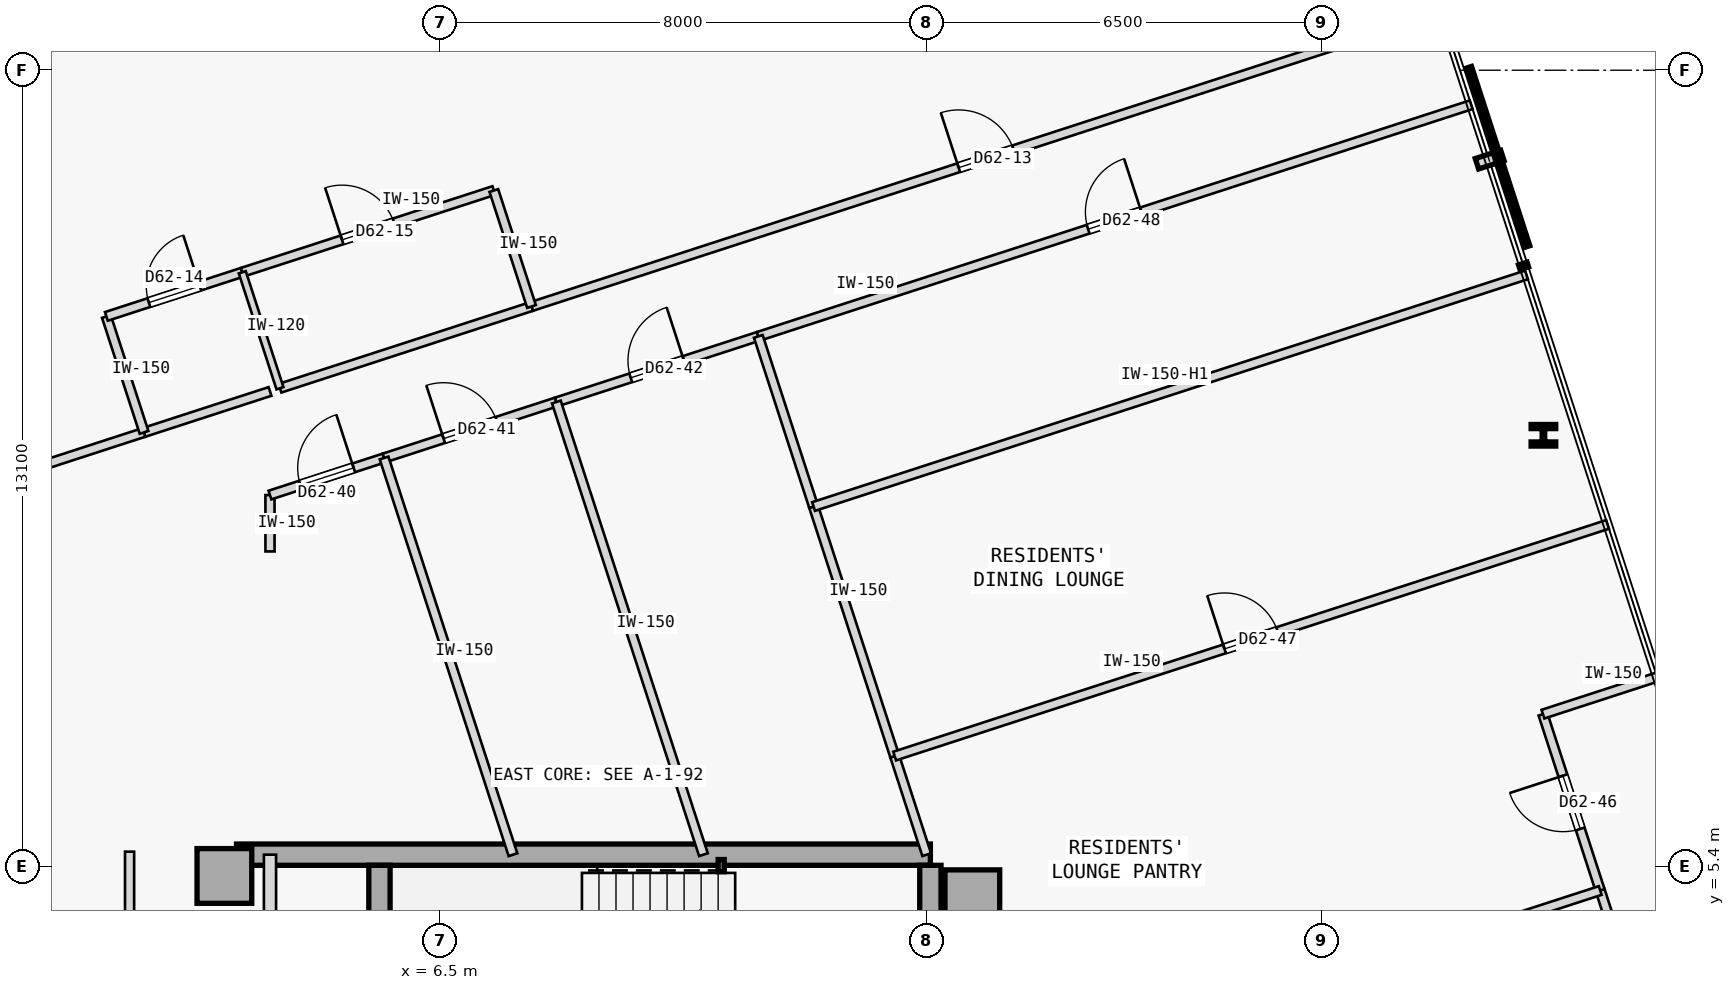
"""IFC4 building model, lengths in metres.
Left out: names, types, materials, properties, quantities, classifications, styles, units other than length and angle.
Written with IfcOpenShell. Run it as: python <this file> out.ifc"""

import sys

from ifc_helpers import new_model, si_unit, direction, frame, frame_2d, origin, origin_2d, place, context, subcontext, project, spatial, rectangle, hollow_rectangle, i_section, extrude, element, fill, save


model = new_model("IFC4")
c1 = context("Model", 3, precision=1e-05, world=origin(), true_north=direction((0.0, 1.0)))
c2 = subcontext(c1, "Body", "Model", "MODEL_VIEW")
j1 = project(units=[si_unit("LENGTHUNIT", "METRE"), si_unit("PLANEANGLEUNIT", "RADIAN")], contexts=[c1])
p1 = place(None, origin())
s1 = spatial("IfcSite", under=j1, at=p1, CompositionType="ELEMENT")
p2 = place(p1, origin())
s2 = spatial("IfcBuilding", under=s1, at=p2, CompositionType="ELEMENT")
p3 = place(p2, frame((0.0, 0.0, 234.35)))
s3 = spatial("IfcBuildingStorey", under=s2, at=p3, CompositionType="ELEMENT", Elevation=234.35)
for number, where, z_axis, x_axis in (
    (1, (15.25, 4.9, 0.0), (0.0, 0.0, 1.0), (1.0, 0.0, 0.0)),
    (2, (2.95, 5.25, 0.0), (0.0, 0.0, 1.0), (1.0, 0.0, 0.0)),
):
    element("IfcColumn", number, at=place(p3, frame(where, z_axis=z_axis, x_axis=x_axis)), inside=s3, PredefinedType="COLUMN", context=c2, shape_type="SweptSolid", body=[
        extrude(rectangle(XDim=0.9, YDim=0.9, at=origin_2d()), origin(), (0.0, 0.0, 1.0), 3.35),
    ])
p4 = place(p3, frame((3.15, 5.6, 0.0), z_axis=(0.0, 0.0, 1.0), x_axis=(1.0, 0.0, 0.0)))
e3 = element("IfcWall", 3, at=p4, inside=s3, PredefinedType="SHEAR", context=c2, shape_type="SweptSolid", body=[
    extrude(rectangle(XDim=11.41, YDim=0.35, at=frame_2d((5.705, 0.0))), origin(), (0.0, 0.0, 1.0), 3.125),
])
p5 = place(p3, frame((14.56, -5.425, 0.0), z_axis=(0.0, 0.0, 1.0), x_axis=(0.0, 1.0, 0.0)))
e4 = element("IfcWall", 4, at=p5, inside=s3, PredefinedType="SHEAR", context=c2, shape_type="SweptSolid", body=[
    extrude(rectangle(XDim=10.85, YDim=0.35, at=frame_2d((5.425, 0.0))), origin(), (0.0, 0.0, 1.0), 3.125),
])
p6 = place(p3, frame((5.5, 2.15, 0.0), z_axis=(0.0, 0.0, 1.0), x_axis=(0.0, 1.0, 0.0)))
e5 = element("IfcWall", 5, at=p6, inside=s3, PredefinedType="SHEAR", context=c2, shape_type="SweptSolid", body=[
    extrude(rectangle(XDim=3.275, YDim=0.35, at=frame_2d((1.638, 0.0))), origin(), (0.0, 0.0, 1.0), 3.125),
])
p7 = place(p3, frame((11.12, 5.42, 0.0), z_axis=(0.0, 0.0, 1.0), x_axis=(1.0, 0.0, 0.0)))
e6 = element("IfcColumn", 6, at=p7, inside=s3, PredefinedType="COLUMN", context=c2, shape_type="SweptSolid", body=[
    extrude(hollow_rectangle(XDim=0.1, YDim=0.2, WallThickness=0.008, at=origin_2d()), origin(), (0.0, 0.0, 1.0), 3.35),
])
p8 = place(p3, frame((24.642, 12.497, 0.0), z_axis=(0.0, 0.0, 1.0), x_axis=(1.0, 0.0, 0.0)))
e7 = element("IfcColumn", 7, at=p8, inside=s3, PredefinedType="COLUMN", context=c2, shape_type="SweptSolid", body=[
    extrude(i_section(OverallWidth=0.405, OverallDepth=0.355, WebThickness=0.042, FlangeThickness=0.068, FilletRadius=0.015, at=origin_2d()), origin(), (0.0, 0.0, 1.0), 3.35),
])
p9 = place(p3, frame((3.7, -1.15, 0.0), z_axis=(0.0, 0.0, 1.0), x_axis=(0.0, 1.0, 0.0)))
e8 = element("IfcWall", 8, at=p9, inside=s3, PredefinedType="STANDARD", context=c2, shape_type="SweptSolid", body=[
    extrude(rectangle(XDim=6.75, YDim=0.2, at=frame_2d((3.375, 0.0))), origin(), (0.0, 0.0, 1.0), 3.125),
])
p10 = place(p9, frame((0.35, 0.0, 0.0)))
e9 = element("IfcOpeningElement", 9, at=p10, cuts=e8, PredefinedType="OPENING", context=c2, shape_type="SweptSolid", body=[
    extrude(rectangle(XDim=0.88, YDim=2.15, at=frame_2d((0.44, 1.075))), frame((0.0, 0.11, 0.0), z_axis=(0.0, -1.0, 0.0), x_axis=(1.0, 0.0, 0.0)), (0.0, 0.0, 1.0), 0.22),
])
p11 = place(p9, frame((2.55, 0.0, 0.0)))
e10 = element("IfcOpeningElement", 10, at=p11, cuts=e8, PredefinedType="OPENING", context=c2, shape_type="SweptSolid", body=[
    extrude(rectangle(XDim=0.92, YDim=2.15, at=frame_2d((0.46, 1.075))), frame((0.0, 0.11, 0.0), z_axis=(0.0, -1.0, 0.0), x_axis=(1.0, 0.0, 0.0)), (0.0, 0.0, 1.0), 0.22),
])
p12 = place(p9, frame((4.22, 0.0, 0.0)))
e11 = element("IfcOpeningElement", 11, at=p12, cuts=e8, PredefinedType="OPENING", context=c2, shape_type="SweptSolid", body=[
    extrude(rectangle(XDim=0.88, YDim=2.15, at=frame_2d((0.44, 1.075))), frame((0.0, 0.11, 0.0), z_axis=(0.0, -1.0, 0.0), x_axis=(1.0, 0.0, 0.0)), (0.0, 0.0, 1.0), 0.22),
])
p13 = place(p3, frame((1.391, -5.648, 0.0), z_axis=(0.0, 0.0, 1.0), x_axis=(-4.3218947e-05, 0.999999999066, 0.0)))
e12 = element("IfcWall", 12, at=p13, inside=s3, PredefinedType="PARTITIONING", context=c2, shape_type="SweptSolid", body=[
    extrude(rectangle(XDim=11.298, YDim=0.15, at=frame_2d((5.649, 0.0))), origin(), (0.0, 0.0, 1.0), 3.125),
])
p14 = place(p3, frame((-4.354, 10.601, 0.0), z_axis=(0.0, 0.0, 1.0), x_axis=(0.951050896078, 0.30903429109, 0.0)))
e13 = element("IfcWall", 13, at=p14, inside=s3, PredefinedType="PARTITIONING", context=c2, shape_type="SweptSolid", body=[
    extrude(rectangle(XDim=6.29, YDim=0.15, at=frame_2d((3.145, 0.0))), origin(), (0.0, 0.0, 1.0), 3.125),
])
p15 = place(p3, frame((8.001, 14.615, 0.0), z_axis=(0.0, 0.0, 1.0), x_axis=(0.951056661035, 0.309016548911, 0.0)))
e14 = element("IfcWall", 14, at=p15, inside=s3, PredefinedType="PARTITIONING", context=c2, shape_type="SweptSolid", body=[
    extrude(rectangle(XDim=15.722, YDim=0.15, at=frame_2d((7.861, 0.0))), origin(), (0.0, 0.0, 1.0), 3.125),
])
p16 = place(p15, frame((7.386, 0.0, 0.0)))
e15 = element("IfcOpeningElement", 15, at=p16, cuts=e14, PredefinedType="OPENING", context=c2, shape_type="SweptSolid", body=[
    extrude(rectangle(XDim=0.95, YDim=2.15, at=frame_2d((0.475, 1.075))), frame((0.0, 0.085, 0.0), z_axis=(0.0, -1.0, 0.0), x_axis=(1.0, 0.0, 0.0)), (0.0, 0.0, 1.0), 0.17),
])
p17 = place(p3, frame((1.629, 12.544, 0.0), z_axis=(0.0, 0.0, 1.0), x_axis=(0.951087596826, 0.308921321963, 0.0)))
e16 = element("IfcWall", 16, at=p17, inside=s3, PredefinedType="PARTITIONING", context=c2, shape_type="SweptSolid", body=[
    extrude(rectangle(XDim=2.178, YDim=0.15, at=frame_2d((1.089, 0.0))), origin(), (0.0, 0.0, 1.0), 3.125),
])
p18 = place(p3, frame((3.864, 13.271, 0.0), z_axis=(0.0, 0.0, 1.0), x_axis=(0.951052627573, 0.309028962374, 0.0)))
e17 = element("IfcWall", 17, at=p18, inside=s3, PredefinedType="PARTITIONING", context=c2, shape_type="SweptSolid", body=[
    extrude(rectangle(XDim=4.35, YDim=0.15, at=frame_2d((2.175, 0.0))), origin(), (0.0, 0.0, 1.0), 3.125),
])
p19 = place(p3, frame((3.7, 10.587, 0.0), z_axis=(0.0, 0.0, 1.0), x_axis=(-0.000789889169, 0.999999688038, 0.0)))
e18 = element("IfcWall", 18, at=p19, inside=s3, PredefinedType="PARTITIONING", context=c2, shape_type="SweptSolid", body=[
    extrude(rectangle(XDim=0.927, YDim=0.15, at=frame_2d((0.464, 0.0))), origin(), (0.0, 0.0, 1.0), 3.125),
])
p20 = place(p3, frame((3.699, 11.514, 0.0), z_axis=(0.0, 0.0, 1.0), x_axis=(0.951068617763, 0.308979747405, 0.0)))
e19 = element("IfcWall", 19, at=p20, inside=s3, PredefinedType="PARTITIONING", context=c2, shape_type="SweptSolid", body=[
    extrude(rectangle(XDim=1.973, YDim=0.15, at=frame_2d((0.986, 0.0))), origin(), (0.0, 0.0, 1.0), 3.125),
])
p21 = place(p20, frame((0.527, 0.0, 0.0)))
e20 = element("IfcOpeningElement", 20, at=p21, cuts=e19, PredefinedType="OPENING", context=c2, shape_type="SweptSolid", body=[
    extrude(rectangle(XDim=0.92, YDim=2.15, at=frame_2d((0.46, 1.075))), frame((0.0, 0.085, 0.0), z_axis=(0.0, -1.0, 0.0), x_axis=(1.0, 0.0, 0.0)), (0.0, 0.0, 1.0), 0.17),
])
p22 = place(p3, frame((5.576, 12.124, 0.0), z_axis=(0.0, 0.0, 1.0), x_axis=(0.951049123732, 0.309039745419, 0.0)))
e21 = element("IfcWall", 21, at=p22, inside=s3, PredefinedType="PARTITIONING", context=c2, shape_type="SweptSolid", body=[
    extrude(rectangle(XDim=2.979, YDim=0.15, at=frame_2d((1.49, 0.0))), origin(), (0.0, 0.0, 1.0), 3.125),
])
p23 = place(p22, frame((1.03, 0.0, 0.0)))
e22 = element("IfcOpeningElement", 22, at=p23, cuts=e21, PredefinedType="OPENING", context=c2, shape_type="SweptSolid", body=[
    extrude(rectangle(XDim=0.92, YDim=2.15, at=frame_2d((0.46, 1.075))), frame((0.0, 0.085, 0.0), z_axis=(0.0, -1.0, 0.0), x_axis=(1.0, 0.0, 0.0)), (0.0, 0.0, 1.0), 0.17),
])
p24 = place(p3, frame((8.409, 13.044, 0.0), z_axis=(0.0, 0.0, 1.0), x_axis=(0.951054104561, 0.309024416831, 0.0)))
e23 = element("IfcWall", 23, at=p24, inside=s3, PredefinedType="PARTITIONING", context=c2, shape_type="SweptSolid", body=[
    extrude(rectangle(XDim=3.492, YDim=0.15, at=frame_2d((1.746, 0.0))), origin(), (0.0, 0.0, 1.0), 3.125),
])
p25 = place(p24, frame((1.286, 0.0, 0.0)))
e24 = element("IfcOpeningElement", 24, at=p25, cuts=e23, PredefinedType="OPENING", context=c2, shape_type="SweptSolid", body=[
    extrude(rectangle(XDim=0.92, YDim=2.15, at=frame_2d((0.46, 1.075))), frame((0.0, 0.085, 0.0), z_axis=(0.0, -1.0, 0.0), x_axis=(1.0, 0.0, 0.0)), (0.0, 0.0, 1.0), 0.17),
])
p26 = place(p3, frame((27.637, -1.332, 0.0), z_axis=(0.0, 0.0, 1.0), x_axis=(-0.309047166719, 0.951046712177, 0.0)))
e25 = element("IfcWall", 25, at=p26, inside=s3, PredefinedType="PARTITIONING", context=c2, shape_type="SweptSolid", body=[
    extrude(rectangle(XDim=6.669, YDim=0.15, at=frame_2d((3.334, 0.0))), origin(), (0.0, 0.0, 1.0), 3.125),
])
p27 = place(p3, frame((25.576, 5.011, 0.0), z_axis=(0.0, 0.0, 1.0), x_axis=(-0.309011835091, 0.951058192633, 0.0)))
e26 = element("IfcWall", 26, at=p27, inside=s3, PredefinedType="PARTITIONING", context=c2, shape_type="SweptSolid", body=[
    extrude(rectangle(XDim=3.049, YDim=0.15, at=frame_2d((1.524, 0.0))), origin(), (0.0, 0.0, 1.0), 3.125),
])
p28 = place(p27, frame((1.064, 0.0, 0.0)))
e27 = element("IfcOpeningElement", 27, at=p28, cuts=e26, PredefinedType="OPENING", context=c2, shape_type="SweptSolid", body=[
    extrude(rectangle(XDim=0.92, YDim=2.15, at=frame_2d((0.46, 1.075))), frame((0.0, 0.085, 0.0), z_axis=(0.0, -1.0, 0.0), x_axis=(1.0, 0.0, 0.0)), (0.0, 0.0, 1.0), 0.17),
])
p29 = place(p3, frame((24.634, 7.91, 0.0), z_axis=(0.0, 0.0, 1.0), x_axis=(0.951054051148, 0.309024581215, 0.0)))
e28 = element("IfcWall", 28, at=p29, inside=s3, PredefinedType="PARTITIONING", context=c2, shape_type="SweptSolid", body=[
    extrude(rectangle(XDim=1.975, YDim=0.15, at=frame_2d((0.988, 0.0))), origin(), (0.0, 0.0, 1.0), 3.125),
])
p30 = place(p3, frame((11.73, 14.123, 0.0), z_axis=(0.0, 0.0, 1.0), x_axis=(0.951060263663, 0.309005460926, 0.0)))
e29 = element("IfcWall", 29, at=p30, inside=s3, PredefinedType="PARTITIONING", context=c2, shape_type="SweptSolid", body=[
    extrude(rectangle(XDim=12.327, YDim=0.15, at=frame_2d((6.164, 0.0))), origin(), (0.0, 0.0, 1.0), 3.125),
])
p31 = place(p30, frame((5.704, 0.0, 0.0)))
e30 = element("IfcOpeningElement", 30, at=p31, cuts=e29, PredefinedType="OPENING", context=c2, shape_type="SweptSolid", body=[
    extrude(rectangle(XDim=0.92, YDim=2.15, at=frame_2d((0.46, 1.075))), frame((0.0, 0.085, 0.0), z_axis=(0.0, -1.0, 0.0), x_axis=(1.0, 0.0, 0.0)), (0.0, 0.0, 1.0), 0.17),
])
p32 = place(p3, frame((1.629, 12.544, 0.0), z_axis=(0.0, 0.0, 1.0), x_axis=(-0.309022749039, 0.951054646472, 0.0)))
e31 = element("IfcWall", 31, at=p32, inside=s3, PredefinedType="PARTITIONING", context=c2, shape_type="SweptSolid", body=[
    extrude(rectangle(XDim=2.005, YDim=0.15, at=frame_2d((1.002, 0.0))), origin(), (0.0, 0.0, 1.0), 3.125),
])
p33 = place(p3, frame((1.009, 14.451, 0.0), z_axis=(0.0, 0.0, 1.0), x_axis=(0.951076048914, 0.308956872689, 0.0)))
e32 = element("IfcWall", 32, at=p33, inside=s3, PredefinedType="PARTITIONING", context=c2, shape_type="SweptSolid", body=[
    extrude(rectangle(XDim=2.35, YDim=0.15, at=frame_2d((1.175, 0.0))), origin(), (0.0, 0.0, 1.0), 3.125),
])
p34 = place(p33, frame((0.735, 0.0, 0.0)))
e33 = element("IfcOpeningElement", 33, at=p34, cuts=e32, PredefinedType="OPENING", context=c2, shape_type="SweptSolid", body=[
    extrude(rectangle(XDim=0.88, YDim=2.15, at=frame_2d((0.44, 1.075))), frame((0.0, 0.085, 0.0), z_axis=(0.0, -1.0, 0.0), x_axis=(1.0, 0.0, 0.0)), (0.0, 0.0, 1.0), 0.17),
])
p35 = place(p3, frame((3.244, 15.177, 0.0), z_axis=(0.0, 0.0, 1.0), x_axis=(0.951052627573, 0.309028962374, 0.0)))
e34 = element("IfcWall", 34, at=p35, inside=s3, PredefinedType="PARTITIONING", context=c2, shape_type="SweptSolid", body=[
    extrude(rectangle(XDim=4.35, YDim=0.15, at=frame_2d((2.175, 0.0))), origin(), (0.0, 0.0, 1.0), 3.125),
])
p36 = place(p35, frame((1.725, 0.0, 0.0)))
e35 = element("IfcOpeningElement", 35, at=p36, cuts=e34, PredefinedType="OPENING", context=c2, shape_type="SweptSolid", body=[
    extrude(rectangle(XDim=0.9, YDim=2.15, at=frame_2d((0.45, 1.075))), frame((0.0, 0.085, 0.0), z_axis=(0.0, -1.0, 0.0), x_axis=(1.0, 0.0, 0.0)), (0.0, 0.0, 1.0), 0.17),
])
p37 = place(p3, frame((8.001, 14.615, 0.0), z_axis=(0.0, 0.0, 1.0), x_axis=(-0.309022749039, 0.951054646472, 0.0)))
e36 = element("IfcWall", 36, at=p37, inside=s3, PredefinedType="PARTITIONING", context=c2, shape_type="SweptSolid", body=[
    extrude(rectangle(XDim=2.005, YDim=0.15, at=frame_2d((1.002, 0.0))), origin(), (0.0, 0.0, 1.0), 3.125),
])
p38 = place(p3, frame((3.864, 13.271, 0.0), z_axis=(0.0, 0.0, 1.0), x_axis=(-0.309022749039, 0.951054646472, 0.0)))
e37 = element("IfcWall", 37, at=p38, inside=s3, PredefinedType="PARTITIONING", context=c2, shape_type="SweptSolid", body=[
    extrude(rectangle(XDim=2.005, YDim=0.12, at=frame_2d((1.002, 0.0))), origin(), (0.0, 0.0, 1.0), 3.125),
])
p39 = place(p3, frame((7.696, 5.599, 0.0), z_axis=(0.0, 0.0, 1.0), x_axis=(-0.309022497646, 0.951054728157, 0.0)))
e38 = element("IfcWall", 38, at=p39, inside=s3, PredefinedType="PARTITIONING", context=c2, shape_type="SweptSolid", body=[
    extrude(rectangle(XDim=6.86, YDim=0.15, at=frame_2d((3.43, 0.0))), origin(), (0.0, 0.0, 1.0), 3.125),
])
p40 = place(p3, frame((10.828, 5.6, 0.0), z_axis=(0.0, 0.0, 1.0), x_axis=(-0.30901342663, 0.951057675519, 0.0)))
e39 = element("IfcWall", 39, at=p40, inside=s3, PredefinedType="PARTITIONING", context=c2, shape_type="SweptSolid", body=[
    extrude(rectangle(XDim=7.827, YDim=0.15, at=frame_2d((3.914, 0.0))), origin(), (0.0, 0.0, 1.0), 3.125),
])
p41 = place(p3, frame((14.5, 5.6, 0.0), z_axis=(0.0, 0.0, 1.0), x_axis=(-0.308872364299, 0.951103497298, 0.0)))
e40 = element("IfcWall", 40, at=p41, inside=s3, PredefinedType="PARTITIONING", context=c2, shape_type="SweptSolid", body=[
    extrude(rectangle(XDim=1.705, YDim=0.15, at=frame_2d((0.853, 0.0))), origin(), (0.0, 0.0, 1.0), 3.125),
])
p42 = place(p3, frame((13.973, 7.221, 0.0), z_axis=(0.0, 0.0, 1.0), x_axis=(-0.309038735568, 0.951049451879, 0.0)))
e41 = element("IfcWall", 41, at=p42, inside=s3, PredefinedType="PARTITIONING", context=c2, shape_type="SweptSolid", body=[
    extrude(rectangle(XDim=4.315, YDim=0.15, at=frame_2d((2.157, 0.0))), origin(), (0.0, 0.0, 1.0), 3.125),
])
p43 = place(p3, frame((12.639, 11.325, 0.0), z_axis=(0.0, 0.0, 1.0), x_axis=(-0.309024151982, 0.951054190618, 0.0)))
e42 = element("IfcWall", 42, at=p43, inside=s3, PredefinedType="PARTITIONING", context=c2, shape_type="SweptSolid", body=[
    extrude(rectangle(XDim=2.942, YDim=0.15, at=frame_2d((1.471, 0.0))), origin(), (0.0, 0.0, 1.0), 3.125),
])
p44 = place(p3, frame((15.73, 1.812, 0.0), z_axis=(0.0, 0.0, 1.0), x_axis=(0.951054517802, 0.309023145037, 0.0)))
e43 = element("IfcWall", 43, at=p44, inside=s3, PredefinedType="PARTITIONING", context=c2, shape_type="SweptSolid", body=[
    extrude(rectangle(XDim=10.352, YDim=0.15, at=frame_2d((5.176, 0.0))), origin(), (0.0, 0.0, 1.0), 3.125),
])
p45 = place(p3, frame((13.973, 7.221, 0.0), z_axis=(0.0, 0.0, 1.0), x_axis=(0.951058372493, 0.309011281527, 0.0)))
e44 = element("IfcWall", 44, at=p45, inside=s3, PredefinedType="PARTITIONING", context=c2, shape_type="SweptSolid", body=[
    extrude(rectangle(XDim=12.327, YDim=0.15, at=frame_2d((6.163, 0.0))), origin(), (0.0, 0.0, 1.0), 3.125),
])
p46 = place(p45, frame((5.704, 0.0, 0.0)))
e45 = element("IfcOpeningElement", 45, at=p46, cuts=e44, PredefinedType="OPENING", context=c2, shape_type="SweptSolid", body=[
    extrude(rectangle(XDim=0.92, YDim=2.15, at=frame_2d((0.46, 1.075))), frame((0.0, 0.085, 0.0), z_axis=(0.0, -1.0, 0.0), x_axis=(1.0, 0.0, 0.0)), (0.0, 0.0, 1.0), 0.17),
])
p47 = place(p3, frame((12.639, 11.325, 0.0), z_axis=(0.0, 0.0, 1.0), x_axis=(0.951054443032, 0.309023375149, 0.0)))
e46 = element("IfcWall", 46, at=p47, inside=s3, PredefinedType="PARTITIONING", context=c2, shape_type="SweptSolid", body=[
    extrude(rectangle(XDim=12.327, YDim=0.15, at=frame_2d((6.164, 0.0))), origin(), (0.0, 0.0, 1.0), 2.675),
])
p48 = place(p16, origin())
e47 = element("IfcDoor", 47, at=p48, inside=s3, OperationType="SINGLE_SWING_LEFT", PredefinedType="DOOR", context=c2, shape_type="SweptSolid", body=[
    extrude(rectangle(XDim=0.95, YDim=2.15, at=frame_2d((0.475, 1.075))), frame((0.0, 0.025, 0.0), z_axis=(0.0, -1.0, 0.0), x_axis=(1.0, 0.0, 0.0)), (0.0, 0.0, 1.0), 0.05),
])
fill(e15, e47)
p49 = place(p34, origin())
e48 = element("IfcDoor", 48, at=p49, inside=s3, OperationType="SINGLE_SWING_RIGHT", PredefinedType="DOOR", context=c2, shape_type="SweptSolid", body=[
    extrude(rectangle(XDim=0.88, YDim=2.15, at=frame_2d((0.44, 1.075))), frame((0.0, 0.025, 0.0), z_axis=(0.0, -1.0, 0.0), x_axis=(1.0, 0.0, 0.0)), (0.0, 0.0, 1.0), 0.05),
])
fill(e33, e48)
p50 = place(p36, origin())
e49 = element("IfcDoor", 49, at=p50, inside=s3, OperationType="SINGLE_SWING_LEFT", PredefinedType="DOOR", context=c2, shape_type="SweptSolid", body=[
    extrude(rectangle(XDim=0.9, YDim=2.15, at=frame_2d((0.45, 1.075))), frame((0.0, 0.025, 0.0), z_axis=(0.0, -1.0, 0.0), x_axis=(1.0, 0.0, 0.0)), (0.0, 0.0, 1.0), 0.05),
])
fill(e35, e49)
p51 = place(p21, origin())
e50 = element("IfcDoor", 50, at=p51, inside=s3, OperationType="SINGLE_SWING_RIGHT", PredefinedType="DOOR", context=c2, shape_type="SweptSolid", body=[
    extrude(rectangle(XDim=0.92, YDim=2.15, at=frame_2d((0.46, 1.075))), frame((0.0, 0.025, 0.0), z_axis=(0.0, -1.0, 0.0), x_axis=(1.0, 0.0, 0.0)), (0.0, 0.0, 1.0), 0.05),
])
fill(e20, e50)
p52 = place(p23, origin())
e51 = element("IfcDoor", 51, at=p52, inside=s3, OperationType="SINGLE_SWING_LEFT", PredefinedType="DOOR", context=c2, shape_type="SweptSolid", body=[
    extrude(rectangle(XDim=0.92, YDim=2.15, at=frame_2d((0.46, 1.075))), frame((0.0, 0.025, 0.0), z_axis=(0.0, -1.0, 0.0), x_axis=(1.0, 0.0, 0.0)), (0.0, 0.0, 1.0), 0.05),
])
fill(e22, e51)
p53 = place(p25, origin())
e52 = element("IfcDoor", 52, at=p53, inside=s3, OperationType="SINGLE_SWING_RIGHT", PredefinedType="DOOR", context=c2, shape_type="SweptSolid", body=[
    extrude(rectangle(XDim=0.92, YDim=2.15, at=frame_2d((0.46, 1.075))), frame((0.0, 0.025, 0.0), z_axis=(0.0, -1.0, 0.0), x_axis=(1.0, 0.0, 0.0)), (0.0, 0.0, 1.0), 0.05),
])
fill(e24, e52)
p54 = place(p28, origin())
e53 = element("IfcDoor", 53, at=p54, inside=s3, OperationType="SINGLE_SWING_RIGHT", PredefinedType="DOOR", context=c2, shape_type="SweptSolid", body=[
    extrude(rectangle(XDim=0.92, YDim=2.15, at=frame_2d((0.46, 1.075))), frame((0.0, 0.025, 0.0), z_axis=(0.0, -1.0, 0.0), x_axis=(1.0, 0.0, 0.0)), (0.0, 0.0, 1.0), 0.05),
])
fill(e27, e53)
p55 = place(p46, origin())
e54 = element("IfcDoor", 54, at=p55, inside=s3, OperationType="SINGLE_SWING_LEFT", PredefinedType="DOOR", context=c2, shape_type="SweptSolid", body=[
    extrude(rectangle(XDim=0.92, YDim=2.15, at=frame_2d((0.46, 1.075))), frame((0.0, 0.025, 0.0), z_axis=(0.0, -1.0, 0.0), x_axis=(1.0, 0.0, 0.0)), (0.0, 0.0, 1.0), 0.05),
])
fill(e45, e54)
p56 = place(p31, origin())
e55 = element("IfcDoor", 55, at=p56, inside=s3, OperationType="SINGLE_SWING_RIGHT", PredefinedType="DOOR", context=c2, shape_type="SweptSolid", body=[
    extrude(rectangle(XDim=0.92, YDim=2.15, at=frame_2d((0.46, 1.075))), frame((0.0, 0.025, 0.0), z_axis=(0.0, -1.0, 0.0), x_axis=(1.0, 0.0, 0.0)), (0.0, 0.0, 1.0), 0.05),
])
fill(e30, e55)
save(model, sys.argv[1])
